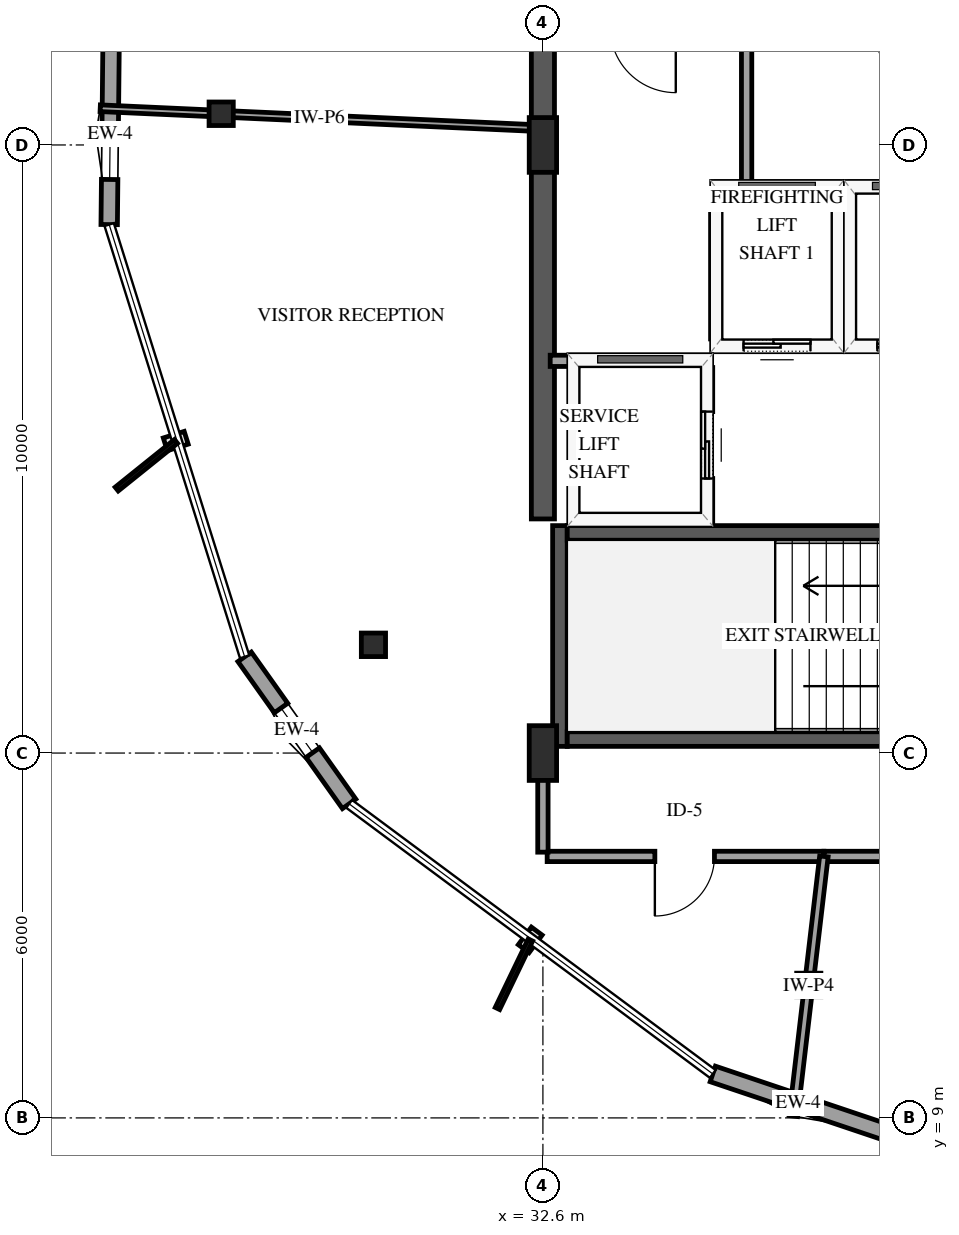
"""IFC4 building model, lengths in metres.
Left out: names, types, materials, properties, quantities, classifications, styles, units other than length and angle.
Written with IfcOpenShell. Run it as: python <this file> out.ifc"""

import sys

from ifc_helpers import new_model, si_unit, direction, frame, frame_2d, origin, origin_2d, place, context, subcontext, project, spatial, rectangle, i_section, extrude, element, fill, save


model = new_model("IFC4")
c1 = context("Model", 3, precision=1e-05, world=origin(), true_north=direction((0.0, 1.0)))
c2 = subcontext(c1, "Body", "Model", "MODEL_VIEW")
j1 = project(units=[si_unit("LENGTHUNIT", "METRE"), si_unit("PLANEANGLEUNIT", "RADIAN")], contexts=[c1])
p1 = place(None, origin())
s1 = spatial("IfcSite", under=j1, at=p1, CompositionType="ELEMENT")
p2 = place(p1, origin())
s2 = spatial("IfcBuilding", under=s1, at=p2, CompositionType="ELEMENT")
p3 = place(p2, frame((0.0, 0.0, 297.25)))
s3 = spatial("IfcBuildingStorey", under=s2, at=p3, CompositionType="ELEMENT", Elevation=297.25)
p4 = place(p3, frame((32.88, 15.11, 0.0), z_axis=(0.0, 0.0, 1.0), x_axis=(0.0, 1.0, 0.0)))
e1 = element("IfcWall", 1, at=p4, inside=s3, PredefinedType="SHEAR", context=c2, shape_type="SweptSolid", body=[
    extrude(rectangle(XDim=3.63, YDim=0.24, at=frame_2d((1.815, 0.0))), origin(), (0.0, 0.0, 1.0), 4.2),
])
for number, where, z_axis, x_axis in (
    (2, (33.0, 15.23, 0.0), (0.0, 0.0, 1.0), (1.0, 0.0, 0.0)),
    (3, (33.0, 18.62, 0.0), (0.0, 0.0, 1.0), (1.0, 0.0, 0.0)),
):
    element("IfcWall", number, at=place(p3, frame(where, z_axis=z_axis, x_axis=x_axis)), inside=s3, PredefinedType="SHEAR", context=c2, shape_type="SweptSolid", body=[
        extrude(rectangle(XDim=8.0, YDim=0.24, at=frame_2d((4.0, 0.0))), origin(), (0.0, 0.0, 1.0), 4.2),
    ])
p5 = place(p3, frame((32.6, 18.85, 0.0), z_axis=(0.0, 0.0, 1.0), x_axis=(0.0, 1.0, 0.0)))
e4 = element("IfcWall", 4, at=p5, inside=s3, PredefinedType="SHEAR", context=c2, shape_type="SweptSolid", body=[
    extrude(rectangle(XDim=12.3, YDim=0.38, at=frame_2d((6.15, 0.0))), origin(), (0.0, 0.0, 1.0), 4.2),
])
for number, where, z_axis, x_axis in (
    (5, (32.6, 15.0, 0.0), (0.0, 0.0, 1.0), (1.0, 0.0, 0.0)),
    (6, (32.6, 25.0, 0.0), (0.0, 0.0, 1.0), (1.0, 0.0, 0.0)),
):
    element("IfcColumn", number, at=place(p3, frame(where, z_axis=z_axis, x_axis=x_axis)), inside=s3, PredefinedType="PILASTER", context=c2, shape_type="SweptSolid", body=[
        extrude(rectangle(XDim=0.45, YDim=0.9, at=origin_2d()), origin(), (0.0, 0.0, 1.0), 4.2),
    ])
for number, where, z_axis, x_axis in (
    (7, (27.309, 25.513, 0.0), (0.0, 0.0, 1.0), (1.0, 0.0, 0.0)),
    (8, (29.813, 16.78, 0.0), (0.0, 0.0, 1.0), (1.0, 0.0, 0.0)),
    (9, (36.972, 11.187, 0.0), (0.0, 0.0, 1.0), (1.0, 0.0, 0.0)),
):
    element("IfcColumn", number, at=place(p3, frame(where, z_axis=z_axis, x_axis=x_axis)), inside=s3, PredefinedType="COLUMN", context=c2, shape_type="SweptSolid", body=[
        extrude(i_section(OverallWidth=0.398, OverallDepth=0.387, WebThickness=0.021, FlangeThickness=0.033, FilletRadius=0.038, at=origin_2d()), origin(), (0.0, 0.0, 1.0), 4.2),
    ])
p6 = place(p3, frame((25.498, 26.657, 0.0), z_axis=(0.0, 0.0, 1.0), x_axis=(-0.010452103923, -0.99994537527, 0.0)))
e10 = element("IfcWall", 10, at=p6, inside=s3, PredefinedType="SOLIDWALL", context=c2, shape_type="SweptSolid", body=[
    extrude(rectangle(XDim=2.967, YDim=0.27, at=frame_2d((1.483, 0.0))), origin(), (0.0, 0.0, 1.0), 3.274),
])
p7 = place(p6, frame((1.325, 0.0, 0.75)))
e11 = element("IfcOpeningElement", 11, at=p7, cuts=e10, PredefinedType="OPENING", context=c2, shape_type="SweptSolid", body=[
    extrude(rectangle(XDim=0.9, YDim=1.5, at=frame_2d((0.45, 0.75))), frame((0.0, 0.145, 0.0), z_axis=(0.0, -1.0, 0.0), x_axis=(1.0, 0.0, 0.0)), (0.0, 0.0, 1.0), 0.29),
])
p8 = place(p3, frame((27.695, 16.583, 0.0), z_axis=(0.0, 0.0, 1.0), x_axis=(0.579274768915, -0.81513234637, 0.0)))
e12 = element("IfcWall", 12, at=p8, inside=s3, PredefinedType="SOLIDWALL", context=c2, shape_type="SweptSolid", body=[
    extrude(rectangle(XDim=2.967, YDim=0.27, at=frame_2d((1.483, 0.0))), origin(), (0.0, 0.0, 1.0), 3.274),
])
p9 = place(p8, frame((1.033, 0.0, 0.75)))
e13 = element("IfcOpeningElement", 13, at=p9, cuts=e12, PredefinedType="OPENING", context=c2, shape_type="SweptSolid", body=[
    extrude(rectangle(XDim=0.9, YDim=1.5, at=frame_2d((0.45, 0.75))), frame((0.0, 0.145, 0.0), z_axis=(0.0, -1.0, 0.0), x_axis=(1.0, 0.0, 0.0)), (0.0, 0.0, 1.0), 0.29),
])
p10 = place(p3, frame((35.394, 9.723, 0.0), z_axis=(0.0, 0.0, 1.0), x_axis=(0.947782395964, -0.31891774786, 0.0)))
e14 = element("IfcWall", 14, at=p10, inside=s3, PredefinedType="SOLIDWALL", context=c2, shape_type="SweptSolid", body=[
    extrude(rectangle(XDim=2.966, YDim=0.27, at=frame_2d((1.483, 0.0))), origin(), (0.0, 0.0, 1.0), 3.274),
])
p11 = place(p3, frame((35.45, 21.7, 0.0), z_axis=(0.0, 0.0, 1.0), x_axis=(1.0, 0.0, 0.0)))
e15 = element("IfcWall", 15, at=p11, inside=s3, PredefinedType="SOLIDWALL", context=c2, shape_type="SweptSolid", body=[
    extrude(rectangle(XDim=2.0, YDim=0.185, at=frame_2d((1.0, 0.0))), origin(), (0.0, 0.0, 1.0), 3.895),
])
p12 = place(p11, frame((0.45, 0.0, 0.0)))
e16 = element("IfcOpeningElement", 16, at=p12, cuts=e15, PredefinedType="OPENING", context=c2, shape_type="SweptSolid", body=[
    extrude(rectangle(XDim=1.1, YDim=2.15, at=frame_2d((0.55, 1.075))), frame((0.0, 0.103, 0.0), z_axis=(0.0, -1.0, 0.0), x_axis=(1.0, 0.0, 0.0)), (0.0, 0.0, 1.0), 0.205),
])
p13 = place(p3, frame((35.45, 24.3, 0.0), z_axis=(0.0, 0.0, 1.0), x_axis=(1.0, 0.0, 0.0)))
e17 = element("IfcWall", 17, at=p13, inside=s3, PredefinedType="SOLIDWALL", context=c2, shape_type="SweptSolid", body=[
    extrude(rectangle(XDim=2.0, YDim=0.185, at=frame_2d((1.0, 0.0))), origin(), (0.0, 0.0, 1.0), 3.895),
])
for number, where, z_axis, x_axis in (
    (18, (35.45, 21.81, 0.0), (0.0, 0.0, 1.0), (0.0, 1.0, 0.0)),
    (19, (37.45, 21.81, 0.0), (0.0, 0.0, 1.0), (0.0, 1.0, 0.0)),
):
    element("IfcWall", number, at=place(p3, frame(where, z_axis=z_axis, x_axis=x_axis)), inside=s3, PredefinedType="SOLIDWALL", context=c2, shape_type="SweptSolid", body=[
        extrude(rectangle(XDim=2.38, YDim=0.185, at=frame_2d((1.19, 0.0))), origin(), (0.0, 0.0, 1.0), 3.895),
    ])
p14 = place(p3, frame((37.65, 21.7, 0.0), z_axis=(0.0, 0.0, 1.0), x_axis=(1.0, 0.0, 0.0)))
e20 = element("IfcWall", 20, at=p14, inside=s3, PredefinedType="SOLIDWALL", context=c2, shape_type="SweptSolid", body=[
    extrude(rectangle(XDim=2.0, YDim=0.185, at=frame_2d((1.0, 0.0))), origin(), (0.0, 0.0, 1.0), 3.895),
])
p15 = place(p14, frame((0.45, 0.0, 0.0)))
e21 = element("IfcOpeningElement", 21, at=p15, cuts=e20, PredefinedType="OPENING", context=c2, shape_type="SweptSolid", body=[
    extrude(rectangle(XDim=1.1, YDim=2.15, at=frame_2d((0.55, 1.075))), frame((0.0, 0.103, 0.0), z_axis=(0.0, -1.0, 0.0), x_axis=(1.0, 0.0, 0.0)), (0.0, 0.0, 1.0), 0.205),
])
p16 = place(p3, frame((37.65, 24.3, 0.0), z_axis=(0.0, 0.0, 1.0), x_axis=(1.0, 0.0, 0.0)))
e22 = element("IfcWall", 22, at=p16, inside=s3, PredefinedType="SOLIDWALL", context=c2, shape_type="SweptSolid", body=[
    extrude(rectangle(XDim=2.0, YDim=0.185, at=frame_2d((1.0, 0.0))), origin(), (0.0, 0.0, 1.0), 3.895),
])
p17 = place(p3, frame((32.72, 21.45, 0.0), z_axis=(0.0, 0.0, 1.0), x_axis=(1.0, 0.0, 0.0)))
e23 = element("IfcWall", 23, at=p17, inside=s3, PredefinedType="SOLIDWALL", context=c2, shape_type="SweptSolid", body=[
    extrude(rectangle(XDim=2.58, YDim=0.185, at=frame_2d((1.29, 0.0))), origin(), (0.0, 0.0, 1.0), 3.895),
])
p18 = place(p3, frame((35.3, 18.79, 0.0), z_axis=(0.0, 0.0, 1.0), x_axis=(0.0, 1.0, 0.0)))
e24 = element("IfcWall", 24, at=p18, inside=s3, PredefinedType="SOLIDWALL", context=c2, shape_type="SweptSolid", body=[
    extrude(rectangle(XDim=2.55, YDim=0.185, at=frame_2d((1.275, 0.0))), origin(), (0.0, 0.0, 1.0), 3.895),
])
p19 = place(p18, frame((0.725, 0.0, 0.0)))
e25 = element("IfcOpeningElement", 25, at=p19, cuts=e24, PredefinedType="OPENING", context=c2, shape_type="SweptSolid", body=[
    extrude(rectangle(XDim=1.1, YDim=2.15, at=frame_2d((0.55, 1.075))), frame((0.0, 0.103, 0.0), z_axis=(0.0, -1.0, 0.0), x_axis=(1.0, 0.0, 0.0)), (0.0, 0.0, 1.0), 0.205),
])
p20 = place(p3, frame((46.18, 13.3, 0.0), z_axis=(0.0, 0.0, 1.0), x_axis=(-1.0, 0.0, 0.0)))
e26 = element("IfcWall", 26, at=p20, inside=s3, PredefinedType="PARTITIONING", context=c2, shape_type="SweptSolid", body=[
    extrude(rectangle(XDim=8.959, YDim=0.17, at=frame_2d((4.479, 0.0))), origin(), (0.0, 0.0, 1.0), 3.895),
])
p21 = place(p20, frame((4.005, 0.0, 0.0)))
e27 = element("IfcOpeningElement", 27, at=p21, cuts=e26, PredefinedType="OPENING", context=c2, shape_type="SweptSolid", body=[
    extrude(rectangle(XDim=0.98, YDim=2.15, at=frame_2d((0.49, 1.075))), frame((0.0, 0.095, 0.0), z_axis=(0.0, -1.0, 0.0), x_axis=(1.0, 0.0, 0.0)), (0.0, 0.0, 1.0), 0.19),
])
p22 = place(p3, frame((32.527, 25.276, 0.0), z_axis=(0.0, 0.0, 1.0), x_axis=(-0.998965188352, 0.045481341909, 0.0)))
e28 = element("IfcWall", 28, at=p22, inside=s3, PredefinedType="PARTITIONING", context=c2, shape_type="SweptSolid", body=[
    extrude(rectangle(XDim=7.215, YDim=0.11, at=frame_2d((3.607, 0.0))), origin(), (0.0, 0.0, 1.0), 3.19),
])
p23 = place(p3, frame((37.221, 13.3, 0.0), z_axis=(0.0, 0.0, 1.0), x_axis=(-1.0, 0.0, 0.0)))
e29 = element("IfcWall", 29, at=p23, inside=s3, PredefinedType="PARTITIONING", context=c2, shape_type="SweptSolid", body=[
    extrude(rectangle(XDim=4.551, YDim=0.17, at=frame_2d((2.275, 0.0))), origin(), (0.0, 0.0, 1.0), 3.895),
])
p24 = place(p23, frame((1.8, 0.0, 0.0)))
e30 = element("IfcOpeningElement", 30, at=p24, cuts=e29, PredefinedType="OPENING", context=c2, shape_type="SweptSolid", body=[
    extrude(rectangle(XDim=0.98, YDim=2.15, at=frame_2d((0.49, 1.075))), frame((0.0, 0.095, 0.0), z_axis=(0.0, -1.0, 0.0), x_axis=(1.0, 0.0, 0.0)), (0.0, 0.0, 1.0), 0.19),
])
p25 = place(p3, frame((37.221, 13.3, 0.0), z_axis=(0.0, 0.0, 1.0), x_axis=(-0.116973029666, -0.993135091682, 0.0)))
e31 = element("IfcWall", 31, at=p25, inside=s3, PredefinedType="PARTITIONING", context=c2, shape_type="SweptSolid", body=[
    extrude(rectangle(XDim=4.3, YDim=0.14, at=frame_2d((2.15, 0.0))), origin(), (0.0, 0.0, 1.0), 3.895),
])
p26 = place(p3, frame((35.95, 26.88, 0.0), z_axis=(0.0, 0.0, 1.0), x_axis=(0.0, -1.0, 0.0)))
e32 = element("IfcWall", 32, at=p26, inside=s3, PredefinedType="PARTITIONING", context=c2, shape_type="SweptSolid", body=[
    extrude(rectangle(XDim=2.58, YDim=0.17, at=frame_2d((1.29, 0.0))), origin(), (0.0, 0.0, 1.0), 3.895),
])
p27 = place(p3, frame((32.6, 13.37, 0.0), z_axis=(0.0, 0.0, 1.0), x_axis=(0.0, 1.0, 0.0)))
e33 = element("IfcWall", 33, at=p27, inside=s3, PredefinedType="PARTITIONING", context=c2, shape_type="SweptSolid", body=[
    extrude(rectangle(XDim=1.51, YDim=0.17, at=frame_2d((0.755, 0.0))), origin(), (0.0, 0.0, 1.0), 3.895),
])
p28 = place(p7, origin())
e34 = element("IfcWindow", 34, at=p28, inside=s3, PartitioningType="SINGLE_PANEL", PredefinedType="WINDOW", context=c2, shape_type="SweptSolid", body=[
    extrude(rectangle(XDim=0.9, YDim=1.5, at=frame_2d((0.45, 0.75))), frame((0.0, 0.03, 0.0), z_axis=(0.0, -1.0, 0.0), x_axis=(1.0, 0.0, 0.0)), (0.0, 0.0, 1.0), 0.06),
])
fill(e11, e34)
p29 = place(p9, origin())
e35 = element("IfcWindow", 35, at=p29, inside=s3, PartitioningType="SINGLE_PANEL", PredefinedType="WINDOW", context=c2, shape_type="SweptSolid", body=[
    extrude(rectangle(XDim=0.9, YDim=1.5, at=frame_2d((0.45, 0.75))), frame((0.0, 0.03, 0.0), z_axis=(0.0, -1.0, 0.0), x_axis=(1.0, 0.0, 0.0)), (0.0, 0.0, 1.0), 0.06),
])
fill(e13, e35)
p30 = place(p12, origin())
e36 = element("IfcDoor", 36, at=p30, inside=s3, OperationType="SLIDING_TO_LEFT", PredefinedType="DOOR", context=c2, shape_type="SweptSolid", body=[
    extrude(rectangle(XDim=1.1, YDim=2.15, at=frame_2d((0.55, 1.075))), frame((0.0, 0.025, 0.0), z_axis=(0.0, -1.0, 0.0), x_axis=(1.0, 0.0, 0.0)), (0.0, 0.0, 1.0), 0.05),
])
fill(e16, e36)
p31 = place(p15, origin())
e37 = element("IfcDoor", 37, at=p31, inside=s3, OperationType="SLIDING_TO_LEFT", PredefinedType="DOOR", context=c2, shape_type="SweptSolid", body=[
    extrude(rectangle(XDim=1.1, YDim=2.15, at=frame_2d((0.55, 1.075))), frame((0.0, 0.025, 0.0), z_axis=(0.0, -1.0, 0.0), x_axis=(1.0, 0.0, 0.0)), (0.0, 0.0, 1.0), 0.05),
])
fill(e21, e37)
p32 = place(p19, origin())
e38 = element("IfcDoor", 38, at=p32, inside=s3, OperationType="SLIDING_TO_LEFT", PredefinedType="DOOR", context=c2, shape_type="SweptSolid", body=[
    extrude(rectangle(XDim=1.1, YDim=2.15, at=frame_2d((0.55, 1.075))), frame((0.0, 0.025, 0.0), z_axis=(0.0, -1.0, 0.0), x_axis=(1.0, 0.0, 0.0)), (0.0, 0.0, 1.0), 0.05),
])
fill(e25, e38)
p33 = place(p24, origin())
e39 = element("IfcDoor", 39, at=p33, inside=s3, OperationType="SINGLE_SWING_RIGHT", PredefinedType="DOOR", context=c2, shape_type="SweptSolid", body=[
    extrude(rectangle(XDim=0.98, YDim=2.15, at=frame_2d((0.49, 1.075))), frame((0.0, 0.025, 0.0), z_axis=(0.0, -1.0, 0.0), x_axis=(1.0, 0.0, 0.0)), (0.0, 0.0, 1.0), 0.05),
])
fill(e30, e39)
save(model, sys.argv[1])
